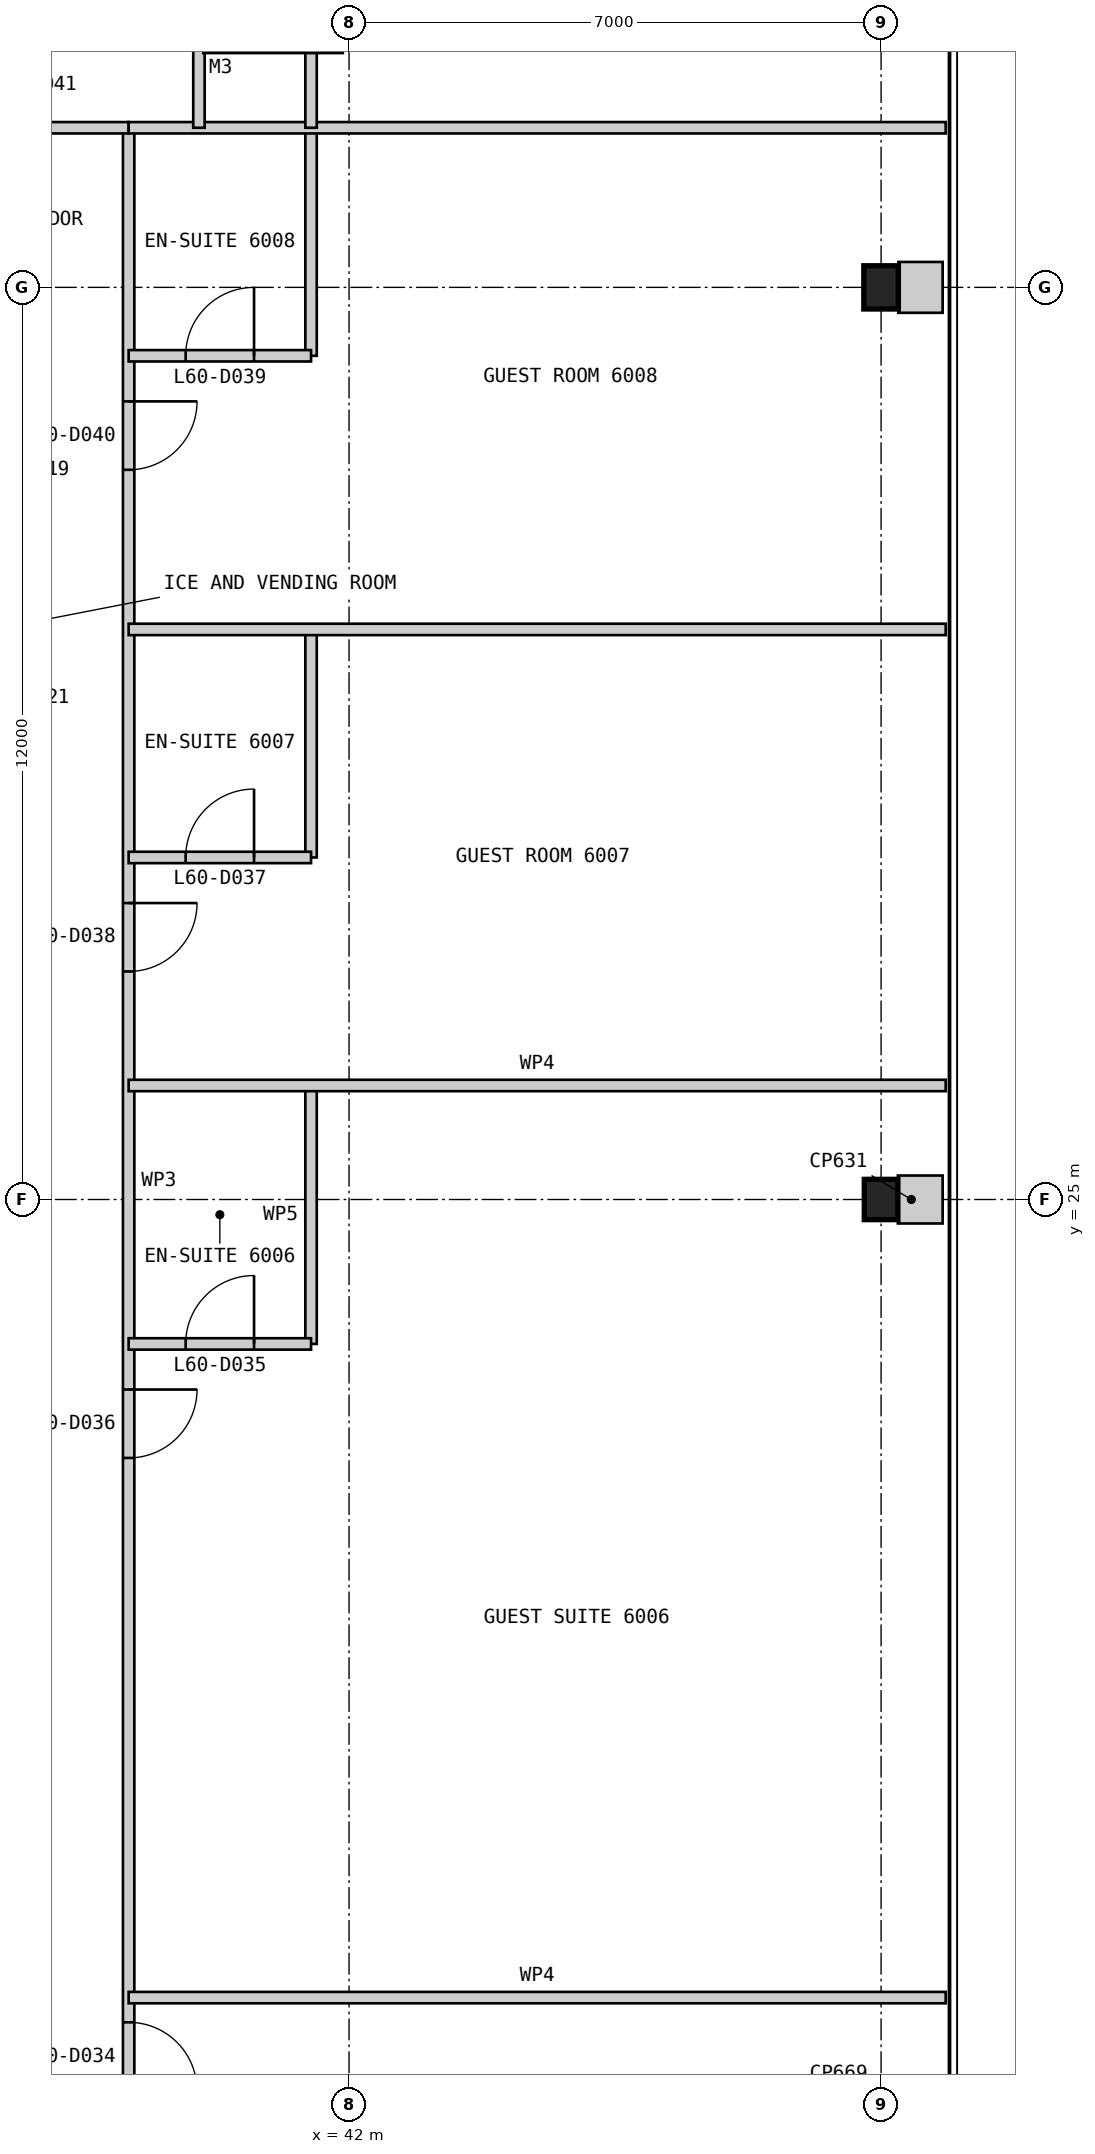
"""IFC4 building model, lengths in metres.
Left out: names, types, materials, properties, quantities, classifications, styles, units other than length and angle.
Written with IfcOpenShell. Run it as: python <this file> out.ifc"""

import sys

from ifc_helpers import new_model, si_unit, direction, frame, frame_2d, origin, origin_2d, place, context, subcontext, project, spatial, rectangle, i_section, extrude, element, fill, save


model = new_model("IFC4")
c1 = context("Model", 3, precision=1e-05, world=origin(), true_north=direction((0.0, 1.0)))
c2 = subcontext(c1, "Body", "Model", "MODEL_VIEW")
j1 = project(units=[si_unit("LENGTHUNIT", "METRE"), si_unit("PLANEANGLEUNIT", "RADIAN")], contexts=[c1])
p1 = place(None, origin())
s1 = spatial("IfcSite", under=j1, at=p1, CompositionType="ELEMENT")
p2 = place(p1, origin())
s2 = spatial("IfcBuilding", under=s1, at=p2, CompositionType="ELEMENT")
p3 = place(p2, frame((0.0, 0.0, 256.0)))
s3 = spatial("IfcBuildingStorey", under=s2, at=p3, CompositionType="ELEMENT", Elevation=256.0)
p4 = place(p3, frame((41.0, 41.0, 0.0), z_axis=(0.0, 0.0, 1.0), x_axis=(1.0, 0.0, 0.0)))
e1 = element("IfcColumn", 1, at=p4, inside=s3, PredefinedType="COLUMN", context=c2, shape_type="SweptSolid", body=[
    extrude(rectangle(XDim=1.8, YDim=1.8, at=origin_2d()), origin(), (0.0, 0.0, 1.0), 3.4),
])
p5 = place(p3, frame((49.0, 25.0, 0.0), z_axis=(0.0, 0.0, 1.0), x_axis=(1.0, 0.0, 0.0)))
e2 = element("IfcColumn", 2, at=p5, inside=s3, PredefinedType="COLUMN", context=c2, shape_type="SweptSolid", body=[
    extrude(i_section(OverallWidth=0.442, OverallDepth=0.531, WebThickness=0.066, FlangeThickness=0.106, at=origin_2d()), origin(), (0.0, 0.0, 1.0), 3.4),
])
p6 = place(p3, frame((49.0, 37.0, 0.0), z_axis=(0.0, 0.0, 1.0), x_axis=(1.0, 0.0, 0.0)))
e3 = element("IfcColumn", 3, at=p6, inside=s3, PredefinedType="COLUMN", context=c2, shape_type="SweptSolid", body=[
    extrude(i_section(OverallWidth=0.455, OverallDepth=0.569, WebThickness=0.078, FlangeThickness=0.125, at=origin_2d()), origin(), (0.0, 0.0, 1.0), 3.4),
])
p7 = place(p3, frame((39.1, 10.9, 0.0), z_axis=(0.0, 0.0, 1.0), x_axis=(0.0, 1.0, 0.0)))
e4 = element("IfcWall", 4, at=p7, inside=s3, PredefinedType="PARTITIONING", context=c2, shape_type="SweptSolid", body=[
    extrude(rectangle(XDim=28.2, YDim=0.15, at=frame_2d((14.1, 0.0))), origin(), (0.0, 0.0, 1.0), 3.25),
])
p8 = place(p7, frame((2.375, 0.0, 0.0)))
e5 = element("IfcOpeningElement", 5, at=p8, cuts=e4, PredefinedType="OPENING", context=c2, shape_type="SweptSolid", body=[
    extrude(rectangle(XDim=0.9, YDim=2.1, at=frame_2d((0.45, 1.05))), frame((0.0, 0.085, 0.0), z_axis=(0.0, -1.0, 0.0), x_axis=(1.0, 0.0, 0.0)), (0.0, 0.0, 1.0), 0.17),
])
p9 = place(p7, frame((10.7, 0.0, 0.0)))
e6 = element("IfcOpeningElement", 6, at=p9, cuts=e4, PredefinedType="OPENING", context=c2, shape_type="SweptSolid", body=[
    extrude(rectangle(XDim=0.9, YDim=2.1, at=frame_2d((0.45, 1.05))), frame((0.0, 0.085, 0.0), z_axis=(0.0, -1.0, 0.0), x_axis=(1.0, 0.0, 0.0)), (0.0, 0.0, 1.0), 0.17),
])
p10 = place(p7, frame((17.1, 0.0, 0.0)))
e7 = element("IfcOpeningElement", 7, at=p10, cuts=e4, PredefinedType="OPENING", context=c2, shape_type="SweptSolid", body=[
    extrude(rectangle(XDim=0.9, YDim=2.1, at=frame_2d((0.45, 1.05))), frame((0.0, 0.085, 0.0), z_axis=(0.0, -1.0, 0.0), x_axis=(1.0, 0.0, 0.0)), (0.0, 0.0, 1.0), 0.17),
])
p11 = place(p7, frame((23.7, 0.0, 0.0)))
e8 = element("IfcOpeningElement", 8, at=p11, cuts=e4, PredefinedType="OPENING", context=c2, shape_type="SweptSolid", body=[
    extrude(rectangle(XDim=0.9, YDim=2.1, at=frame_2d((0.45, 1.05))), frame((0.0, 0.085, 0.0), z_axis=(0.0, -1.0, 0.0), x_axis=(1.0, 0.0, 0.0)), (0.0, 0.0, 1.0), 0.17),
])
p12 = place(p3, frame((49.85, 14.5, 0.0), z_axis=(0.0, 0.0, 1.0), x_axis=(-1.0, 0.0, 0.0)))
e9 = element("IfcWall", 9, at=p12, inside=s3, PredefinedType="PARTITIONING", context=c2, shape_type="SweptSolid", body=[
    extrude(rectangle(XDim=10.75, YDim=0.15, at=frame_2d((5.375, 0.0))), origin(), (0.0, 0.0, 1.0), 3.25),
])
p13 = place(p3, frame((41.5, 23.1, 0.0), z_axis=(0.0, 0.0, 1.0), x_axis=(0.0, 1.0, 0.0)))
e10 = element("IfcWall", 10, at=p13, inside=s3, PredefinedType="PARTITIONING", context=c2, shape_type="SweptSolid", body=[
    extrude(rectangle(XDim=3.4, YDim=0.15, at=frame_2d((1.7, 0.0))), origin(), (0.0, 0.0, 1.0), 3.25),
])
p14 = place(p3, frame((41.5, 23.1, 0.0), z_axis=(0.0, 0.0, 1.0), x_axis=(-1.0, 0.0, 0.0)))
e11 = element("IfcWall", 11, at=p14, inside=s3, PredefinedType="PARTITIONING", context=c2, shape_type="SweptSolid", body=[
    extrude(rectangle(XDim=2.4, YDim=0.15, at=frame_2d((1.2, 0.0))), origin(), (0.0, 0.0, 1.0), 3.25),
])
p15 = place(p14, frame((0.75, 0.0, 0.0)))
e12 = element("IfcOpeningElement", 12, at=p15, cuts=e11, PredefinedType="OPENING", context=c2, shape_type="SweptSolid", body=[
    extrude(rectangle(XDim=0.9, YDim=2.1, at=frame_2d((0.45, 1.05))), frame((0.0, 0.085, 0.0), z_axis=(0.0, -1.0, 0.0), x_axis=(1.0, 0.0, 0.0)), (0.0, 0.0, 1.0), 0.17),
])
p16 = place(p3, frame((49.85, 26.5, 0.0), z_axis=(0.0, 0.0, 1.0), x_axis=(-1.0, 0.0, 0.0)))
e13 = element("IfcWall", 13, at=p16, inside=s3, PredefinedType="PARTITIONING", context=c2, shape_type="SweptSolid", body=[
    extrude(rectangle(XDim=10.75, YDim=0.15, at=frame_2d((5.375, 0.0))), origin(), (0.0, 0.0, 1.0), 3.25),
])
p17 = place(p3, frame((41.5, 29.5, 0.0), z_axis=(0.0, 0.0, 1.0), x_axis=(0.0, 1.0, 0.0)))
e14 = element("IfcWall", 14, at=p17, inside=s3, PredefinedType="PARTITIONING", context=c2, shape_type="SweptSolid", body=[
    extrude(rectangle(XDim=3.0, YDim=0.15, at=frame_2d((1.5, 0.0))), origin(), (0.0, 0.0, 1.0), 3.25),
])
p18 = place(p3, frame((41.5, 29.5, 0.0), z_axis=(0.0, 0.0, 1.0), x_axis=(-1.0, 0.0, 0.0)))
e15 = element("IfcWall", 15, at=p18, inside=s3, PredefinedType="PARTITIONING", context=c2, shape_type="SweptSolid", body=[
    extrude(rectangle(XDim=2.4, YDim=0.15, at=frame_2d((1.2, 0.0))), origin(), (0.0, 0.0, 1.0), 3.25),
])
p19 = place(p18, frame((0.75, 0.0, 0.0)))
e16 = element("IfcOpeningElement", 16, at=p19, cuts=e15, PredefinedType="OPENING", context=c2, shape_type="SweptSolid", body=[
    extrude(rectangle(XDim=0.9, YDim=2.1, at=frame_2d((0.45, 1.05))), frame((0.0, 0.085, 0.0), z_axis=(0.0, -1.0, 0.0), x_axis=(1.0, 0.0, 0.0)), (0.0, 0.0, 1.0), 0.17),
])
p20 = place(p3, frame((49.85, 32.5, 0.0), z_axis=(0.0, 0.0, 1.0), x_axis=(-1.0, 0.0, 0.0)))
e17 = element("IfcWall", 17, at=p20, inside=s3, PredefinedType="PARTITIONING", context=c2, shape_type="SweptSolid", body=[
    extrude(rectangle(XDim=10.75, YDim=0.15, at=frame_2d((5.375, 0.0))), origin(), (0.0, 0.0, 1.0), 3.25),
])
p21 = place(p3, frame((41.5, 36.1, 0.0), z_axis=(0.0, 0.0, 1.0), x_axis=(0.0, 1.0, 0.0)))
e18 = element("IfcWall", 18, at=p21, inside=s3, PredefinedType="PARTITIONING", context=c2, shape_type="SweptSolid", body=[
    extrude(rectangle(XDim=3.0, YDim=0.15, at=frame_2d((1.5, 0.0))), origin(), (0.0, 0.0, 1.0), 3.25),
])
p22 = place(p3, frame((41.5, 36.1, 0.0), z_axis=(0.0, 0.0, 1.0), x_axis=(-1.0, 0.0, 0.0)))
e19 = element("IfcWall", 19, at=p22, inside=s3, PredefinedType="PARTITIONING", context=c2, shape_type="SweptSolid", body=[
    extrude(rectangle(XDim=2.4, YDim=0.15, at=frame_2d((1.2, 0.0))), origin(), (0.0, 0.0, 1.0), 3.25),
])
p23 = place(p22, frame((0.75, 0.0, 0.0)))
e20 = element("IfcOpeningElement", 20, at=p23, cuts=e19, PredefinedType="OPENING", context=c2, shape_type="SweptSolid", body=[
    extrude(rectangle(XDim=0.9, YDim=2.1, at=frame_2d((0.45, 1.05))), frame((0.0, 0.085, 0.0), z_axis=(0.0, -1.0, 0.0), x_axis=(1.0, 0.0, 0.0)), (0.0, 0.0, 1.0), 0.17),
])
p24 = place(p3, frame((39.1, 39.1, 0.0), z_axis=(0.0, 0.0, 1.0), x_axis=(-1.0, 0.0, 0.0)))
e21 = element("IfcWall", 21, at=p24, inside=s3, PredefinedType="PARTITIONING", context=c2, shape_type="SweptSolid", body=[
    extrude(rectangle(XDim=28.2, YDim=0.15, at=frame_2d((14.1, 0.0))), origin(), (0.0, 0.0, 1.0), 3.25),
])
p25 = place(p24, frame((2.375, 0.0, 0.0)))
e22 = element("IfcOpeningElement", 22, at=p25, cuts=e21, PredefinedType="OPENING", context=c2, shape_type="SweptSolid", body=[
    extrude(rectangle(XDim=0.9, YDim=2.1, at=frame_2d((0.45, 1.05))), frame((0.0, 0.085, 0.0), z_axis=(0.0, -1.0, 0.0), x_axis=(1.0, 0.0, 0.0)), (0.0, 0.0, 1.0), 0.17),
])
p26 = place(p24, frame((10.7, 0.0, 0.0)))
e23 = element("IfcOpeningElement", 23, at=p26, cuts=e21, PredefinedType="OPENING", context=c2, shape_type="SweptSolid", body=[
    extrude(rectangle(XDim=0.9, YDim=2.1, at=frame_2d((0.45, 1.05))), frame((0.0, 0.085, 0.0), z_axis=(0.0, -1.0, 0.0), x_axis=(1.0, 0.0, 0.0)), (0.0, 0.0, 1.0), 0.17),
])
p27 = place(p24, frame((17.1, 0.0, 0.0)))
e24 = element("IfcOpeningElement", 24, at=p27, cuts=e21, PredefinedType="OPENING", context=c2, shape_type="SweptSolid", body=[
    extrude(rectangle(XDim=0.9, YDim=2.1, at=frame_2d((0.45, 1.05))), frame((0.0, 0.085, 0.0), z_axis=(0.0, -1.0, 0.0), x_axis=(1.0, 0.0, 0.0)), (0.0, 0.0, 1.0), 0.17),
])
p28 = place(p24, frame((23.4, 0.0, 0.0)))
e25 = element("IfcOpeningElement", 25, at=p28, cuts=e21, PredefinedType="OPENING", context=c2, shape_type="SweptSolid", body=[
    extrude(rectangle(XDim=1.0, YDim=2.1, at=frame_2d((0.5, 1.05))), frame((0.0, 0.085, 0.0), z_axis=(0.0, -1.0, 0.0), x_axis=(1.0, 0.0, 0.0)), (0.0, 0.0, 1.0), 0.17),
])
p29 = place(p3, frame((49.85, 39.1, 0.0), z_axis=(0.0, 0.0, 1.0), x_axis=(-1.0, 0.0, 0.0)))
e26 = element("IfcWall", 26, at=p29, inside=s3, PredefinedType="PARTITIONING", context=c2, shape_type="SweptSolid", body=[
    extrude(rectangle(XDim=10.75, YDim=0.15, at=frame_2d((5.375, 0.0))), origin(), (0.0, 0.0, 1.0), 3.25),
])
p30 = place(p3, frame((40.025, 41.5, 0.0), z_axis=(0.0, 0.0, 1.0), x_axis=(0.0, -1.0, 0.0)))
e27 = element("IfcWall", 27, at=p30, inside=s3, PredefinedType="PARTITIONING", context=c2, shape_type="SweptSolid", body=[
    extrude(rectangle(XDim=2.4, YDim=0.15, at=frame_2d((1.2, 0.0))), origin(), (0.0, 0.0, 1.0), 3.25),
])
p31 = place(p3, frame((41.5, 49.85, 0.0), z_axis=(0.0, 0.0, 1.0), x_axis=(0.0, -1.0, 0.0)))
e28 = element("IfcWall", 28, at=p31, inside=s3, PredefinedType="PARTITIONING", context=c2, shape_type="SweptSolid", body=[
    extrude(rectangle(XDim=10.75, YDim=0.15, at=frame_2d((5.375, 0.0))), origin(), (0.0, 0.0, 1.0), 3.25),
])
p32 = place(p31, frame((5.0, 0.0, 0.0)))
e29 = element("IfcOpeningElement", 29, at=p32, cuts=e28, PredefinedType="OPENING", context=c2, shape_type="SweptSolid", body=[
    extrude(rectangle(XDim=0.9, YDim=2.1, at=frame_2d((0.45, 1.05))), frame((0.0, 0.085, 0.0), z_axis=(0.0, -1.0, 0.0), x_axis=(1.0, 0.0, 0.0)), (0.0, 0.0, 1.0), 0.17),
])
p33 = place(p3, frame((49.81, 25.0, 0.0), z_axis=(0.0, 0.0, 1.0), x_axis=(-1.0, 0.0, 0.0)))
e30 = element("IfcWall", 30, at=p33, inside=s3, PredefinedType="PARTITIONING", context=c2, shape_type="SweptSolid", body=[
    extrude(rectangle(XDim=0.589, YDim=0.631, at=frame_2d((0.294, 0.0))), origin(), (0.0, 0.0, 1.0), 3.25),
])
p34 = place(p3, frame((49.81, 37.0, 0.0), z_axis=(0.0, 0.0, 1.0), x_axis=(-1.0, 0.0, 0.0)))
e31 = element("IfcWall", 31, at=p34, inside=s3, PredefinedType="PARTITIONING", context=c2, shape_type="SweptSolid", body=[
    extrude(rectangle(XDim=0.583, YDim=0.669, at=frame_2d((0.292, 0.0))), origin(), (0.0, 0.0, 1.0), 3.25),
])
p35 = place(p8, frame((0.9, 0.0, 0.0), z_axis=(0.0, 0.0, 1.0), x_axis=(-1.0, 0.0, 0.0)))
e32 = element("IfcDoor", 32, at=p35, inside=s3, OperationType="SINGLE_SWING_RIGHT", PredefinedType="DOOR", context=c2, shape_type="SweptSolid", body=[
    extrude(rectangle(XDim=0.9, YDim=2.1, at=frame_2d((0.45, 1.05))), frame((0.0, 0.025, 0.0), z_axis=(0.0, -1.0, 0.0), x_axis=(1.0, 0.0, 0.0)), (0.0, 0.0, 1.0), 0.05),
])
fill(e5, e32)
p36 = place(p15, frame((0.9, 0.0, 0.0), z_axis=(0.0, 0.0, 1.0), x_axis=(-1.0, 0.0, 0.0)))
e33 = element("IfcDoor", 33, at=p36, inside=s3, OperationType="SINGLE_SWING_RIGHT", PredefinedType="DOOR", context=c2, shape_type="SweptSolid", body=[
    extrude(rectangle(XDim=0.9, YDim=2.1, at=frame_2d((0.45, 1.05))), frame((0.0, 0.025, 0.0), z_axis=(0.0, -1.0, 0.0), x_axis=(1.0, 0.0, 0.0)), (0.0, 0.0, 1.0), 0.05),
])
fill(e12, e33)
p37 = place(p9, frame((0.9, 0.0, 0.0), z_axis=(0.0, 0.0, 1.0), x_axis=(-1.0, 0.0, 0.0)))
e34 = element("IfcDoor", 34, at=p37, inside=s3, OperationType="SINGLE_SWING_LEFT", PredefinedType="DOOR", context=c2, shape_type="SweptSolid", body=[
    extrude(rectangle(XDim=0.9, YDim=2.1, at=frame_2d((0.45, 1.05))), frame((0.0, 0.025, 0.0), z_axis=(0.0, -1.0, 0.0), x_axis=(1.0, 0.0, 0.0)), (0.0, 0.0, 1.0), 0.05),
])
fill(e6, e34)
p38 = place(p19, frame((0.9, 0.0, 0.0), z_axis=(0.0, 0.0, 1.0), x_axis=(-1.0, 0.0, 0.0)))
e35 = element("IfcDoor", 35, at=p38, inside=s3, OperationType="SINGLE_SWING_RIGHT", PredefinedType="DOOR", context=c2, shape_type="SweptSolid", body=[
    extrude(rectangle(XDim=0.9, YDim=2.1, at=frame_2d((0.45, 1.05))), frame((0.0, 0.025, 0.0), z_axis=(0.0, -1.0, 0.0), x_axis=(1.0, 0.0, 0.0)), (0.0, 0.0, 1.0), 0.05),
])
fill(e16, e35)
p39 = place(p10, frame((0.9, 0.0, 0.0), z_axis=(0.0, 0.0, 1.0), x_axis=(-1.0, 0.0, 0.0)))
e36 = element("IfcDoor", 36, at=p39, inside=s3, OperationType="SINGLE_SWING_LEFT", PredefinedType="DOOR", context=c2, shape_type="SweptSolid", body=[
    extrude(rectangle(XDim=0.9, YDim=2.1, at=frame_2d((0.45, 1.05))), frame((0.0, 0.025, 0.0), z_axis=(0.0, -1.0, 0.0), x_axis=(1.0, 0.0, 0.0)), (0.0, 0.0, 1.0), 0.05),
])
fill(e7, e36)
p40 = place(p23, frame((0.9, 0.0, 0.0), z_axis=(0.0, 0.0, 1.0), x_axis=(-1.0, 0.0, 0.0)))
e37 = element("IfcDoor", 37, at=p40, inside=s3, OperationType="SINGLE_SWING_RIGHT", PredefinedType="DOOR", context=c2, shape_type="SweptSolid", body=[
    extrude(rectangle(XDim=0.9, YDim=2.1, at=frame_2d((0.45, 1.05))), frame((0.0, 0.025, 0.0), z_axis=(0.0, -1.0, 0.0), x_axis=(1.0, 0.0, 0.0)), (0.0, 0.0, 1.0), 0.05),
])
fill(e20, e37)
p41 = place(p11, frame((0.9, 0.0, 0.0), z_axis=(0.0, 0.0, 1.0), x_axis=(-1.0, 0.0, 0.0)))
e38 = element("IfcDoor", 38, at=p41, inside=s3, OperationType="SINGLE_SWING_LEFT", PredefinedType="DOOR", context=c2, shape_type="SweptSolid", body=[
    extrude(rectangle(XDim=0.9, YDim=2.1, at=frame_2d((0.45, 1.05))), frame((0.0, 0.025, 0.0), z_axis=(0.0, -1.0, 0.0), x_axis=(1.0, 0.0, 0.0)), (0.0, 0.0, 1.0), 0.05),
])
fill(e8, e38)
save(model, sys.argv[1])
